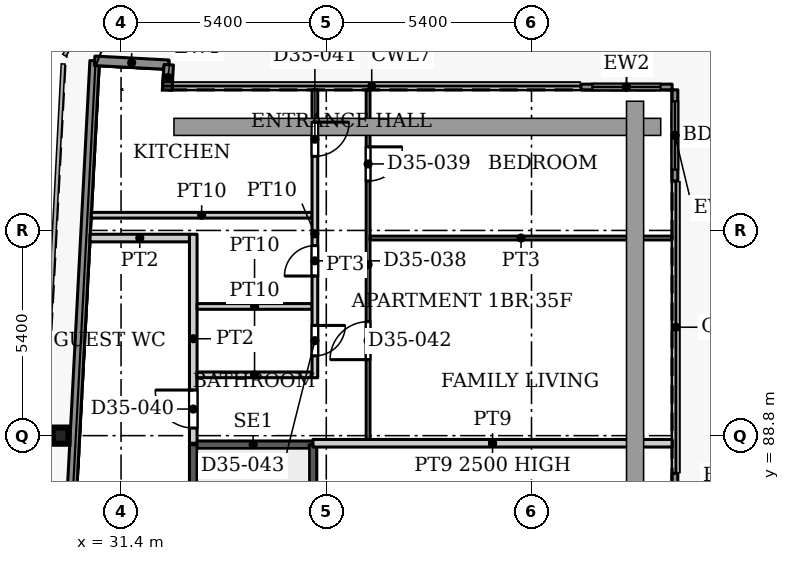
"""IFC4 building model, lengths in metres.
Left out: names, types, materials, properties, quantities, classifications, styles, units other than length and angle.
Written with IfcOpenShell. Run it as: python <this file> out.ifc"""

import sys

from ifc_helpers import new_model, si_unit, direction, frame, frame_2d, origin, origin_2d, place, context, subcontext, project, spatial, rectangle, i_section, extrude, source, transform, mapped, element, fill, save


model = new_model("IFC4")
c1 = context("Model", 3, precision=1e-05, world=origin(), true_north=direction((0.0, 1.0)))
c2 = subcontext(c1, "Body", "Model", "MODEL_VIEW")
j1 = project(units=[si_unit("LENGTHUNIT", "METRE"), si_unit("PLANEANGLEUNIT", "RADIAN")], contexts=[c1])
p1 = place(None, origin())
s1 = spatial("IfcSite", under=j1, at=p1, CompositionType="ELEMENT")
p2 = place(p1, origin())
s2 = spatial("IfcBuilding", under=s1, at=p2, CompositionType="ELEMENT")
p3 = place(p2, frame((0.0, 0.0, 152.6)))
s3 = spatial("IfcBuildingStorey", under=s2, at=p3, CompositionType="ELEMENT", Elevation=152.6)
p4 = place(p3, frame((29.811, 88.8, 0.0), z_axis=(0.0, 0.0, 1.0), x_axis=(1.0, 0.0, 0.0)))
e1 = element("IfcColumn", 1, at=p4, inside=s3, PredefinedType="COLUMN", context=c2, shape_type="SweptSolid", body=[
    extrude(i_section(OverallWidth=0.409, OverallDepth=0.425, WebThickness=0.033, FlangeThickness=0.052, FilletRadius=0.013, at=origin_2d()), origin(), (0.0, 0.0, 1.0), 3.9),
])
p5 = place(p3, frame((27.195, 31.969, 0.0), z_axis=(0.0, 0.0, 1.0), x_axis=(0.052554995867, 0.998618031286, 0.0)))
e2 = element("IfcWall", 2, at=p5, inside=s3, PredefinedType="SOLIDWALL", context=c2, shape_type="SweptSolid", body=[
    extrude(rectangle(XDim=66.787, YDim=0.25, at=frame_2d((33.394, 0.0))), origin(), (0.0, 0.0, 1.0), 3.75),
])
p6 = place(p3, frame((30.705, 98.664, 0.0), z_axis=(0.0, 0.0, 1.0), x_axis=(0.998577785791, -0.053314216913, 0.0)))
e3 = element("IfcWall", 3, at=p6, inside=s3, PredefinedType="SOLIDWALL", context=c2, shape_type="SweptSolid", body=[
    extrude(rectangle(XDim=1.951, YDim=0.25, at=frame_2d((0.975, 0.0))), origin(), (0.0, 0.0, 1.0), 3.75),
])
p7 = place(p3, frame((32.653, 98.56, 0.0), z_axis=(0.0, 0.0, 1.0), x_axis=(-0.054093451632, -0.998535877418, 0.0)))
e4 = element("IfcWall", 4, at=p7, inside=s3, PredefinedType="SOLIDWALL", context=c2, shape_type="SweptSolid", body=[
    extrude(rectangle(XDim=0.668, YDim=0.25, at=frame_2d((0.334, 0.0))), origin(), (0.0, 0.0, 1.0), 3.75),
])
p8 = place(p3, frame((43.5, 97.975, 0.0), z_axis=(0.0, 0.0, 1.0), x_axis=(1.0, 0.0, 0.0)))
e5 = element("IfcWall", 5, at=p8, inside=s3, PredefinedType="SOLIDWALL", context=c2, shape_type="SweptSolid", body=[
    extrude(rectangle(XDim=2.4, YDim=0.15, at=frame_2d((1.2, 0.0))), origin(), (0.0, 0.0, 1.0), 3.75),
])
p9 = place(p8, frame((0.3, 0.0, 0.0)))
e6 = element("IfcOpeningElement", 6, at=p9, cuts=e5, PredefinedType="OPENING", context=c2, shape_type="SweptSolid", body=[
    extrude(rectangle(XDim=1.8, YDim=2.4, at=frame_2d((0.9, 1.2))), frame((0.0, 0.085, 0.0), z_axis=(0.0, -1.0, 0.0), x_axis=(1.0, 0.0, 0.0)), (0.0, 0.0, 1.0), 0.17),
])
p10 = place(p3, frame((45.975, 97.9, 0.0), z_axis=(0.0, 0.0, 1.0), x_axis=(0.0, -1.0, 0.0)))
e7 = element("IfcWall", 7, at=p10, inside=s3, PredefinedType="SOLIDWALL", context=c2, shape_type="SweptSolid", body=[
    extrude(rectangle(XDim=2.4, YDim=0.15, at=frame_2d((1.2, 0.0))), origin(), (0.0, 0.0, 1.0), 3.75),
])
p11 = place(p10, frame((0.3, 0.0, 0.0)))
e8 = element("IfcOpeningElement", 8, at=p11, cuts=e7, PredefinedType="OPENING", context=c2, shape_type="SweptSolid", body=[
    extrude(rectangle(XDim=1.8, YDim=2.4, at=frame_2d((0.9, 1.2))), frame((0.0, 0.085, 0.0), z_axis=(0.0, -1.0, 0.0), x_axis=(1.0, 0.0, 0.0)), (0.0, 0.0, 1.0), 0.17),
])
p12 = place(p3, frame((45.975, 87.806, 0.0), z_axis=(0.0, 0.0, 1.0), x_axis=(0.0, -1.0, 0.0)))
e9 = element("IfcWall", 9, at=p12, inside=s3, PredefinedType="SOLIDWALL", context=c2, shape_type="SweptSolid", body=[
    extrude(rectangle(XDim=2.4, YDim=0.15, at=frame_2d((1.2, 0.0))), origin(), (0.0, 0.0, 1.0), 3.75),
])
p13 = place(p12, frame((0.3, 0.0, 0.0)))
e10 = element("IfcOpeningElement", 10, at=p13, cuts=e9, PredefinedType="OPENING", context=c2, shape_type="SweptSolid", body=[
    extrude(rectangle(XDim=1.8, YDim=2.4, at=frame_2d((0.9, 1.2))), frame((0.0, 0.085, 0.0), z_axis=(0.0, -1.0, 0.0), x_axis=(1.0, 0.0, 0.0)), (0.0, 0.0, 1.0), 0.17),
])
p14 = place(p3, frame((33.3, 88.56, 0.0), z_axis=(0.0, 0.0, 1.0), x_axis=(1.0, 0.0, 0.0)))
e11 = element("IfcWall", 11, at=p14, inside=s3, PredefinedType="SHEAR", context=c2, shape_type="SweptSolid", body=[
    extrude(rectangle(XDim=3.15, YDim=0.2, at=frame_2d((1.575, 0.0))), origin(), (0.0, 0.0, 1.0), 3.9),
])
p15 = place(p3, frame((33.3, 79.4, 0.0), z_axis=(0.0, 0.0, 1.0), x_axis=(0.0, 1.0, 0.0)))
e12 = element("IfcWall", 12, at=p15, inside=s3, PredefinedType="SHEAR", context=c2, shape_type="SweptSolid", body=[
    extrude(rectangle(XDim=9.16, YDim=0.2, at=frame_2d((4.58, 0.0))), origin(), (0.0, 0.0, 1.0), 3.9),
])
p16 = place(p15, frame((0.35, 0.0, 0.0)))
e13 = element("IfcOpeningElement", 13, at=p16, cuts=e12, PredefinedType="OPENING", context=c2, shape_type="SweptSolid", body=[
    extrude(rectangle(XDim=1.1, YDim=2.2, at=frame_2d((0.55, 1.1))), frame((0.0, 0.11, 0.0), z_axis=(0.0, -1.0, 0.0), x_axis=(1.0, 0.0, 0.0)), (0.0, 0.0, 1.0), 0.22),
])
p17 = place(p3, frame((36.45, 79.4, 0.0), z_axis=(0.0, 0.0, 1.0), x_axis=(0.0, 1.0, 0.0)))
e14 = element("IfcWall", 14, at=p17, inside=s3, PredefinedType="SHEAR", context=c2, shape_type="SweptSolid", body=[
    extrude(rectangle(XDim=9.16, YDim=0.2, at=frame_2d((4.58, 0.0))), origin(), (0.0, 0.0, 1.0), 3.9),
])
p18 = place(p3, frame((30.617, 94.6, 0.0), z_axis=(0.0, 0.0, 1.0), x_axis=(1.0, 0.0, 0.0)))
e15 = element("IfcWall", 15, at=p18, inside=s3, PredefinedType="PARTITIONING", context=c2, shape_type="SweptSolid", body=[
    extrude(rectangle(XDim=5.808, YDim=0.15, at=frame_2d((2.904, 0.0))), origin(), (0.0, 0.0, 1.0), 3.6),
])
p19 = place(p3, frame((30.585, 94.0, 0.0), z_axis=(0.0, 0.0, 1.0), x_axis=(1.0, 0.0, 0.0)))
e16 = element("IfcWall", 16, at=p19, inside=s3, PredefinedType="PARTITIONING", context=c2, shape_type="SweptSolid", body=[
    extrude(rectangle(XDim=2.615, YDim=0.2, at=frame_2d((1.308, 0.0))), origin(), (0.0, 0.0, 1.0), 3.6),
])
p20 = place(p3, frame((33.3, 88.6, 0.0), z_axis=(0.0, 0.0, 1.0), x_axis=(0.0, 1.0, 0.0)))
e17 = element("IfcWall", 17, at=p20, inside=s3, PredefinedType="PARTITIONING", context=c2, shape_type="SweptSolid", body=[
    extrude(rectangle(XDim=5.5, YDim=0.2, at=frame_2d((2.75, 0.0))), origin(), (0.0, 0.0, 1.0), 3.6),
])
p21 = place(p20, frame((0.4, 0.0, 0.0)))
e18 = element("IfcOpeningElement", 18, at=p21, cuts=e17, PredefinedType="OPENING", context=c2, shape_type="SweptSolid", body=[
    extrude(rectangle(XDim=1.0, YDim=2.1, at=frame_2d((0.5, 1.05))), frame((0.0, 0.11, 0.0), z_axis=(0.0, -1.0, 0.0), x_axis=(1.0, 0.0, 0.0)), (0.0, 0.0, 1.0), 0.22),
])
for number, where, z_axis, x_axis in (
    (19, (33.4, 90.4, 0.0), (0.0, 0.0, 1.0), (1.0, 0.0, 0.0)),
    (20, (33.4, 92.2, 0.0), (0.0, 0.0, 1.0), (1.0, 0.0, 0.0)),
):
    element("IfcWall", number, at=place(p3, frame(where, z_axis=z_axis, x_axis=x_axis)), inside=s3, PredefinedType="PARTITIONING", context=c2, shape_type="SweptSolid", body=[
        extrude(rectangle(XDim=3.025, YDim=0.15, at=frame_2d((1.513, 0.0))), origin(), (0.0, 0.0, 1.0), 3.6),
    ])
p22 = place(p3, frame((36.45, 88.6, 0.0), z_axis=(0.0, 0.0, 1.0), x_axis=(1.0, 0.0, 0.0)))
e21 = element("IfcWall", 21, at=p22, inside=s3, PredefinedType="PARTITIONING", context=c2, shape_type="SweptSolid", body=[
    extrude(rectangle(XDim=9.45, YDim=0.2, at=frame_2d((4.725, 0.0))), origin(), (0.0, 0.0, 1.0), 2.5),
])
p23 = place(p3, frame((36.5, 90.325, 0.0), z_axis=(0.0, 0.0, 1.0), x_axis=(0.0, 1.0, 0.0)))
e22 = element("IfcWall", 22, at=p23, inside=s3, PredefinedType="PARTITIONING", context=c2, shape_type="SweptSolid", body=[
    extrude(rectangle(XDim=7.575, YDim=0.15, at=frame_2d((3.788, 0.0))), origin(), (0.0, 0.0, 1.0), 3.6),
])
p24 = place(p23, frame((2.675, 0.0, 0.0)))
e23 = element("IfcOpeningElement", 23, at=p24, cuts=e22, PredefinedType="OPENING", context=c2, shape_type="SweptSolid", body=[
    extrude(rectangle(XDim=0.8, YDim=2.1, at=frame_2d((0.4, 1.05))), frame((0.0, 0.085, 0.0), z_axis=(0.0, -1.0, 0.0), x_axis=(1.0, 0.0, 0.0)), (0.0, 0.0, 1.0), 0.17),
])
p25 = place(p23, frame((5.825, 0.0, 0.0)))
e24 = element("IfcOpeningElement", 24, at=p25, cuts=e22, PredefinedType="OPENING", context=c2, shape_type="SweptSolid", body=[
    extrude(rectangle(XDim=0.9, YDim=2.1, at=frame_2d((0.45, 1.05))), frame((0.0, 0.085, 0.0), z_axis=(0.0, -1.0, 0.0), x_axis=(1.0, 0.0, 0.0)), (0.0, 0.0, 1.0), 0.17),
])
p26 = place(p23, frame((0.575, 0.0, 0.0)))
e25 = element("IfcOpeningElement", 25, at=p26, cuts=e22, PredefinedType="OPENING", context=c2, shape_type="SweptSolid", body=[
    extrude(rectangle(XDim=0.8, YDim=2.1, at=frame_2d((0.4, 1.05))), frame((0.0, 0.085, 0.0), z_axis=(0.0, -1.0, 0.0), x_axis=(1.0, 0.0, 0.0)), (0.0, 0.0, 1.0), 0.17),
])
p27 = place(p3, frame((37.9, 88.7, 0.0), z_axis=(0.0, 0.0, 1.0), x_axis=(0.0, 1.0, 0.0)))
e26 = element("IfcWall", 26, at=p27, inside=s3, PredefinedType="PARTITIONING", context=c2, shape_type="SweptSolid", body=[
    extrude(rectangle(XDim=9.2, YDim=0.1, at=frame_2d((4.6, 0.0))), origin(), (0.0, 0.0, 1.0), 3.6),
])
p28 = place(p27, frame((6.8, 0.0, 0.0)))
e27 = element("IfcOpeningElement", 27, at=p28, cuts=e26, PredefinedType="OPENING", context=c2, shape_type="SweptSolid", body=[
    extrude(rectangle(XDim=0.9, YDim=2.1, at=frame_2d((0.45, 1.05))), frame((0.0, 0.06, 0.0), z_axis=(0.0, -1.0, 0.0), x_axis=(1.0, 0.0, 0.0)), (0.0, 0.0, 1.0), 0.12),
])
p29 = place(p27, frame((2.1, 0.0, 0.0)))
e28 = element("IfcOpeningElement", 28, at=p29, cuts=e26, PredefinedType="OPENING", context=c2, shape_type="SweptSolid", body=[
    extrude(rectangle(XDim=1.0, YDim=2.1, at=frame_2d((0.5, 1.05))), frame((0.0, 0.06, 0.0), z_axis=(0.0, -1.0, 0.0), x_axis=(1.0, 0.0, 0.0)), (0.0, 0.0, 1.0), 0.12),
])
p30 = place(p3, frame((37.95, 94.0, 0.0), z_axis=(0.0, 0.0, 1.0), x_axis=(1.0, 0.0, 0.0)))
e29 = element("IfcWall", 29, at=p30, inside=s3, PredefinedType="PARTITIONING", context=c2, shape_type="SweptSolid", body=[
    extrude(rectangle(XDim=7.95, YDim=0.1, at=frame_2d((3.975, 0.0))), origin(), (0.0, 0.0, 1.0), 3.6),
])
m1 = source(origin(), c2, "Body", "SweptSolid", [
    extrude(rectangle(XDim=1.8, YDim=2.4, at=frame_2d((0.9, 1.2))), frame((0.0, 0.025, 0.0), z_axis=(0.0, -1.0, 0.0), x_axis=(1.0, 0.0, 0.0)), (0.0, 0.0, 1.0), 0.05),
])
p31 = place(p9, origin())
e30 = element("IfcDoor", 30, at=p31, inside=s3, OperationType="SLIDING_TO_LEFT", PredefinedType="DOOR", context=c2, shape_type="MappedRepresentation", body=[
    mapped(m1, transform((0.0, 0.0, 0.0), x_axis=(1.0, 0.0, 0.0), y_axis=(0.0, 1.0, 0.0), z_axis=(0.0, 0.0, 1.0), scale=1.0)),
])
fill(e6, e30)
p32 = place(p11, origin())
e31 = element("IfcDoor", 31, at=p32, inside=s3, OperationType="SLIDING_TO_LEFT", PredefinedType="DOOR", context=c2, shape_type="MappedRepresentation", body=[
    mapped(m1, transform((0.0, 0.0, 0.0), x_axis=(1.0, 0.0, 0.0), y_axis=(0.0, 1.0, 0.0), z_axis=(0.0, 0.0, 1.0), scale=1.0)),
])
fill(e8, e31)
m2 = source(origin(), c2, "Body", "SweptSolid", [
    extrude(rectangle(XDim=0.8, YDim=2.1, at=frame_2d((0.4, 1.05))), frame((0.0, 0.025, 0.0), z_axis=(0.0, -1.0, 0.0), x_axis=(1.0, 0.0, 0.0)), (0.0, 0.0, 1.0), 0.05),
])
p33 = place(p24, origin())
e32 = element("IfcDoor", 32, at=p33, inside=s3, OperationType="SINGLE_SWING_LEFT", PredefinedType="DOOR", context=c2, shape_type="MappedRepresentation", body=[
    mapped(m2, transform((0.0, 0.0, 0.0), x_axis=(1.0, 0.0, 0.0), y_axis=(0.0, 1.0, 0.0), z_axis=(0.0, 0.0, 1.0), scale=1.0)),
])
fill(e23, e32)
m3 = source(origin(), c2, "Body", "SweptSolid", [
    extrude(rectangle(XDim=0.9, YDim=2.1, at=frame_2d((0.45, 1.05))), frame((0.0, 0.025, 0.0), z_axis=(0.0, -1.0, 0.0), x_axis=(1.0, 0.0, 0.0)), (0.0, 0.0, 1.0), 0.05),
])
p34 = place(p28, origin())
e33 = element("IfcDoor", 33, at=p34, inside=s3, OperationType="SINGLE_SWING_RIGHT", PredefinedType="DOOR", context=c2, shape_type="MappedRepresentation", body=[
    mapped(m3, transform((0.0, 0.0, 0.0), x_axis=(1.0, 0.0, 0.0), y_axis=(0.0, 1.0, 0.0), z_axis=(0.0, 0.0, 1.0), scale=1.0)),
])
fill(e27, e33)
m4 = source(origin(), c2, "Body", "SweptSolid", [
    extrude(rectangle(XDim=1.0, YDim=2.1, at=frame_2d((0.5, 1.05))), frame((0.0, 0.025, 0.0), z_axis=(0.0, -1.0, 0.0), x_axis=(1.0, 0.0, 0.0)), (0.0, 0.0, 1.0), 0.05),
])
p35 = place(p21, origin())
e34 = element("IfcDoor", 34, at=p35, inside=s3, OperationType="SINGLE_SWING_LEFT", PredefinedType="DOOR", context=c2, shape_type="MappedRepresentation", body=[
    mapped(m4, transform((0.0, 0.0, 0.0), x_axis=(1.0, 0.0, 0.0), y_axis=(0.0, 1.0, 0.0), z_axis=(0.0, 0.0, 1.0), scale=1.0)),
])
fill(e18, e34)
p36 = place(p25, origin())
e35 = element("IfcDoor", 35, at=p36, inside=s3, OperationType="SINGLE_SWING_RIGHT", PredefinedType="DOOR", context=c2, shape_type="MappedRepresentation", body=[
    mapped(m3, transform((0.0, 0.0, 0.0), x_axis=(1.0, 0.0, 0.0), y_axis=(0.0, 1.0, 0.0), z_axis=(0.0, 0.0, 1.0), scale=1.0)),
])
fill(e24, e35)
m5 = source(origin(), c2, "Body", "SweptSolid", [
    extrude(rectangle(XDim=1.0, YDim=2.1, at=frame_2d((0.5, 1.05))), frame((0.0, 0.025, 0.0), z_axis=(0.0, -1.0, 0.0), x_axis=(1.0, 0.0, 0.0)), (0.0, 0.0, 1.0), 0.05),
])
p37 = place(p29, origin())
e36 = element("IfcDoor", 36, at=p37, inside=s3, OperationType="SINGLE_SWING_LEFT", PredefinedType="DOOR", context=c2, shape_type="MappedRepresentation", body=[
    mapped(m5, transform((0.0, 0.0, 0.0), x_axis=(1.0, 0.0, 0.0), y_axis=(0.0, 1.0, 0.0), z_axis=(0.0, 0.0, 1.0), scale=1.0)),
])
fill(e28, e36)
p38 = place(p26, origin())
e37 = element("IfcDoor", 37, at=p38, inside=s3, OperationType="SINGLE_SWING_RIGHT", PredefinedType="DOOR", context=c2, shape_type="MappedRepresentation", body=[
    mapped(m2, transform((0.0, 0.0, 0.0), x_axis=(1.0, 0.0, 0.0), y_axis=(0.0, 1.0, 0.0), z_axis=(0.0, 0.0, 1.0), scale=1.0)),
])
fill(e25, e37)
save(model, sys.argv[1])
